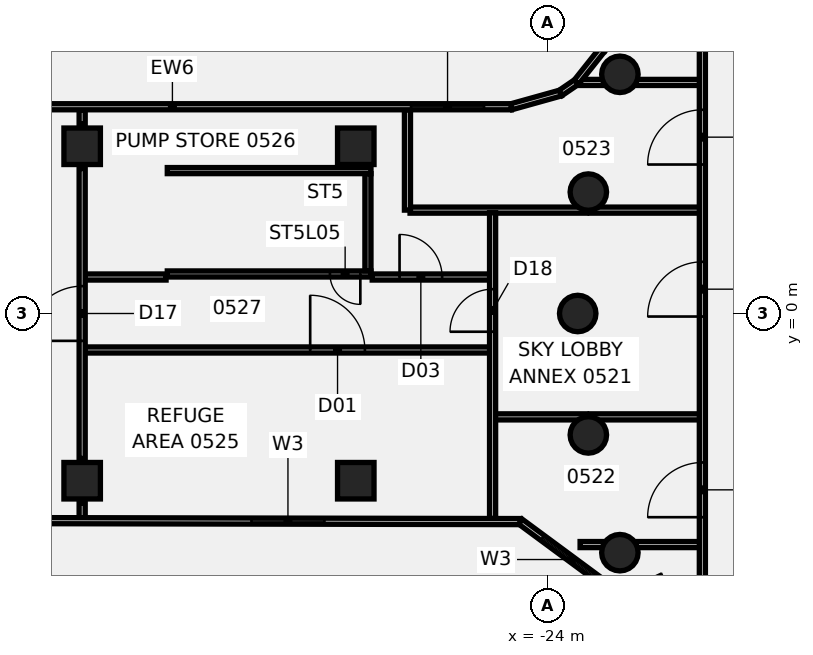
"""IFC4 building model, lengths in metres.
Left out: names, types, materials, properties, quantities, classifications, styles, units other than length and angle.
Written with IfcOpenShell. Run it as: python <this file> out.ifc"""

import sys

from ifc_helpers import new_model, si_unit, direction, frame, frame_2d, origin, origin_2d, place, context, subcontext, project, spatial, polyline, rectangle, circle, outline, extrude, element, fill, save


model = new_model("IFC4")
c1 = context("Model", 3, precision=1e-05, world=origin(), true_north=direction((0.0, 1.0)))
c2 = subcontext(c1, "Body", "Model", "MODEL_VIEW")
j1 = project(units=[si_unit("LENGTHUNIT", "METRE"), si_unit("PLANEANGLEUNIT", "RADIAN")], contexts=[c1])
p1 = place(None, origin())
s1 = spatial("IfcSite", under=j1, at=p1, CompositionType="ELEMENT")
p2 = place(p1, origin())
s2 = spatial("IfcBuilding", under=s1, at=p2, CompositionType="ELEMENT")
p3 = place(p2, frame((0.0, 0.0, 29.5)))
s3 = spatial("IfcBuildingStorey", under=s2, at=p3, CompositionType="ELEMENT", Elevation=29.5)
for number, where, z_axis, x_axis in (
    (1, (-21.613, 7.866, -0.6), (0.0, 0.0, 1.0), (1.0, 0.0, 0.0)),
    (2, (-22.651, 3.994, -0.6), (0.0, 0.0, 1.0), (1.0, 0.0, 0.0)),
    (3, (-23.0, 0.0, -0.6), (0.0, 0.0, 1.0), (1.0, 0.0, 0.0)),
    (4, (-22.651, -3.994, -0.6), (0.0, 0.0, 1.0), (1.0, 0.0, 0.0)),
    (5, (-21.613, -7.866, -0.6), (0.0, 0.0, 1.0), (1.0, 0.0, 0.0)),
):
    element("IfcColumn", number, at=place(p3, frame(where, z_axis=z_axis, x_axis=x_axis)), inside=s3, PredefinedType="COLUMN", context=c2, shape_type="SweptSolid", body=[
        extrude(circle(Radius=0.6, at=origin_2d()), origin(), (0.0, 0.0, 1.0), 4.96),
    ])
p4 = place(p3, frame((-39.3, -5.5, -0.6), z_axis=(0.0, 0.0, 1.0), x_axis=(1.0, 0.0, 0.0)))
e6 = element("IfcColumn", 6, at=p4, inside=s3, PredefinedType="COLUMN", context=c2, shape_type="SweptSolid", body=[
    extrude(rectangle(XDim=1.2, YDim=1.2, at=origin_2d()), origin(), (0.0, 0.0, 1.0), 4.926),
])
p5 = place(p3, frame((-39.3, 5.5, -0.6), z_axis=(0.0, 0.0, 1.0), x_axis=(1.0, 0.0, 0.0)))
e7 = element("IfcColumn", 7, at=p5, inside=s3, PredefinedType="COLUMN", context=c2, shape_type="SweptSolid", body=[
    extrude(rectangle(XDim=1.2, YDim=1.2, at=origin_2d()), origin(), (0.0, 0.0, 1.0), 4.926),
])
for number, where, z_axis, x_axis in (
    (8, (-30.3, -5.5, -0.6), (0.0, 0.0, 1.0), (1.0, 0.0, 0.0)),
    (9, (-30.3, 5.5, -0.6), (0.0, 0.0, 1.0), (1.0, 0.0, 0.0)),
):
    element("IfcColumn", number, at=place(p3, frame(where, z_axis=z_axis, x_axis=x_axis)), inside=s3, PredefinedType="COLUMN", context=c2, shape_type="SweptSolid", body=[
        extrude(rectangle(XDim=1.2, YDim=1.2, at=origin_2d()), origin(), (0.0, 0.0, 1.0), 4.939),
    ])
p6 = place(p3, frame((-39.22, -1.2, 0.0), z_axis=(0.0, 0.0, 1.0), x_axis=(1.0, 0.0, 0.0)))
e10 = element("IfcWall", 10, at=p6, inside=s3, PredefinedType="PARTITIONING", context=c2, shape_type="SweptSolid", body=[
    extrude(rectangle(XDim=13.335, YDim=0.2, at=frame_2d((6.667, 0.0))), origin(), (0.0, 0.0, 1.0), 3.76),
])
p7 = place(p6, frame((7.42, 0.0, 0.0)))
e11 = element("IfcOpeningElement", 11, at=p7, cuts=e10, PredefinedType="OPENING", context=c2, shape_type="SweptSolid", body=[
    extrude(rectangle(XDim=1.8, YDim=2.1, at=frame_2d((0.9, 1.05))), frame((0.0, 0.11, 0.0), z_axis=(0.0, -1.0, 0.0), x_axis=(1.0, 0.0, 0.0)), (0.0, 0.0, 1.0), 0.22),
])
p8 = place(p3, frame((-39.22, 1.2, 0.0), z_axis=(0.0, 0.0, 1.0), x_axis=(1.0, 0.0, 0.0)))
e12 = element("IfcWall", 12, at=p8, inside=s3, PredefinedType="PARTITIONING", context=c2, shape_type="SweptSolid", body=[
    extrude(rectangle(XDim=2.68, YDim=0.2, at=frame_2d((1.34, 0.0))), origin(), (0.0, 0.0, 1.0), 3.76),
])
p9 = place(p3, frame((-29.76, 1.2, 0.0), z_axis=(0.0, 0.0, 1.0), x_axis=(1.0, 0.0, 0.0)))
e13 = element("IfcWall", 13, at=p9, inside=s3, PredefinedType="PARTITIONING", context=c2, shape_type="SweptSolid", body=[
    extrude(rectangle(XDim=3.875, YDim=0.2, at=frame_2d((1.938, 0.0))), origin(), (0.0, 0.0, 1.0), 3.76),
])
p10 = place(p9, frame((0.9, 0.0, 0.0)))
e14 = element("IfcOpeningElement", 14, at=p10, cuts=e13, PredefinedType="OPENING", context=c2, shape_type="SweptSolid", body=[
    extrude(rectangle(XDim=1.4, YDim=2.1, at=frame_2d((0.7, 1.05))), frame((0.0, 0.11, 0.0), z_axis=(0.0, -1.0, 0.0), x_axis=(1.0, 0.0, 0.0)), (0.0, 0.0, 1.0), 0.22),
])
p11 = place(p3, frame((-28.515, 3.4, 0.0), z_axis=(0.0, 0.0, 1.0), x_axis=(1.0, 0.0, 0.0)))
e15 = element("IfcWall", 15, at=p11, inside=s3, PredefinedType="PARTITIONING", context=c2, shape_type="SweptSolid", body=[
    extrude(rectangle(XDim=5.804, YDim=0.2, at=frame_2d((2.902, 0.0))), origin(), (0.0, 0.0, 1.0), 3.76),
])
p12 = place(p3, frame((-22.591, 3.4, 0.0), z_axis=(0.0, 0.0, 1.0), x_axis=(1.0, 0.0, 0.0)))
e16 = element("IfcWall", 16, at=p12, inside=s3, PredefinedType="PARTITIONING", context=c2, shape_type="SweptSolid", body=[
    extrude(rectangle(XDim=3.605, YDim=0.2, at=frame_2d((1.803, 0.0))), origin(), (0.0, 0.0, 1.0), 3.76),
])
p13 = place(p3, frame((-25.715, -3.4, 0.0), z_axis=(0.0, 0.0, 1.0), x_axis=(1.0, 0.0, 0.0)))
e17 = element("IfcWall", 17, at=p13, inside=s3, PredefinedType="PARTITIONING", context=c2, shape_type="SweptSolid", body=[
    extrude(rectangle(XDim=3.004, YDim=0.2, at=frame_2d((1.502, 0.0))), origin(), (0.0, 0.0, 1.0), 3.76),
])
p14 = place(p3, frame((-22.591, -3.4, 0.0), z_axis=(0.0, 0.0, 1.0), x_axis=(1.0, 0.0, 0.0)))
e18 = element("IfcWall", 18, at=p14, inside=s3, PredefinedType="PARTITIONING", context=c2, shape_type="SweptSolid", body=[
    extrude(rectangle(XDim=3.605, YDim=0.2, at=frame_2d((1.803, 0.0))), origin(), (0.0, 0.0, 1.0), 3.76),
])
p15 = place(p3, frame((-22.922, -7.6, 0.0), z_axis=(0.0, 0.0, 1.0), x_axis=(1.0, 0.0, 0.0)))
e19 = element("IfcWall", 19, at=p15, inside=s3, PredefinedType="PARTITIONING", context=c2, shape_type="SweptSolid", body=[
    extrude(rectangle(XDim=0.77, YDim=0.2, at=frame_2d((0.385, 0.0))), origin(), (0.0, 0.0, 1.0), 3.76),
])
p16 = place(p3, frame((-21.074, -7.6, 0.0), z_axis=(0.0, 0.0, 1.0), x_axis=(1.0, 0.0, 0.0)))
e20 = element("IfcWall", 20, at=p16, inside=s3, PredefinedType="PARTITIONING", context=c2, shape_type="SweptSolid", body=[
    extrude(rectangle(XDim=2.089, YDim=0.2, at=frame_2d((1.044, 0.0))), origin(), (0.0, 0.0, 1.0), 3.76),
])
p17 = place(p3, frame((-22.921, 7.6, 0.0), z_axis=(0.0, 0.0, 1.0), x_axis=(1.0, 0.0, 0.0)))
e21 = element("IfcWall", 21, at=p17, inside=s3, PredefinedType="PARTITIONING", context=c2, shape_type="SweptSolid", body=[
    extrude(rectangle(XDim=0.769, YDim=0.2, at=frame_2d((0.385, 0.0))), origin(), (0.0, 0.0, 1.0), 3.76),
])
p18 = place(p3, frame((-21.074, 7.6, 0.0), z_axis=(0.0, 0.0, 1.0), x_axis=(1.0, 0.0, 0.0)))
e22 = element("IfcWall", 22, at=p18, inside=s3, PredefinedType="PARTITIONING", context=c2, shape_type="SweptSolid", body=[
    extrude(rectangle(XDim=2.089, YDim=0.2, at=frame_2d((1.044, 0.0))), origin(), (0.0, 0.0, 1.0), 3.76),
])
p19 = place(p3, frame((-39.3, -6.715, 0.0), z_axis=(0.0, 0.0, 1.0), x_axis=(0.0, 1.0, 0.0)))
e23 = element("IfcWall", 23, at=p19, inside=s3, PredefinedType="PARTITIONING", context=c2, shape_type="SweptSolid", body=[
    extrude(rectangle(XDim=0.485, YDim=0.2, at=frame_2d((0.243, 0.0))), origin(), (0.0, 0.0, 1.0), 3.76),
])
p20 = place(p3, frame((-39.3, -4.77, 0.0), z_axis=(0.0, 0.0, 1.0), x_axis=(0.0, 1.0, 0.0)))
e24 = element("IfcWall", 24, at=p20, inside=s3, PredefinedType="PARTITIONING", context=c2, shape_type="SweptSolid", body=[
    extrude(rectangle(XDim=9.54, YDim=0.2, at=frame_2d((4.77, 0.0))), origin(), (0.0, 0.0, 1.0), 3.76),
])
p21 = place(p20, frame((3.87, 0.0, 0.0)))
e25 = element("IfcOpeningElement", 25, at=p21, cuts=e24, PredefinedType="OPENING", context=c2, shape_type="SweptSolid", body=[
    extrude(rectangle(XDim=1.8, YDim=2.1, at=frame_2d((0.9, 1.05))), frame((0.0, 0.11, 0.0), z_axis=(0.0, -1.0, 0.0), x_axis=(1.0, 0.0, 0.0)), (0.0, 0.0, 1.0), 0.22),
])
p22 = place(p3, frame((-39.3, 6.23, 0.0), z_axis=(0.0, 0.0, 1.0), x_axis=(0.0, 1.0, 0.0)))
e26 = element("IfcWall", 26, at=p22, inside=s3, PredefinedType="PARTITIONING", context=c2, shape_type="SweptSolid", body=[
    extrude(rectangle(XDim=0.469, YDim=0.2, at=frame_2d((0.234, 0.0))), origin(), (0.0, 0.0, 1.0), 3.76),
])
p23 = place(p3, frame((-28.6, 3.4, 0.0), z_axis=(0.0, 0.0, 1.0), x_axis=(0.0, 1.0, 0.0)))
e27 = element("IfcWall", 27, at=p23, inside=s3, PredefinedType="PARTITIONING", context=c2, shape_type="SweptSolid", body=[
    extrude(rectangle(XDim=3.299, YDim=0.2, at=frame_2d((1.649, 0.0))), origin(), (0.0, 0.0, 1.0), 3.76),
])
p24 = place(p3, frame((-25.8, -6.742, 0.0), z_axis=(0.0, 0.0, 1.0), x_axis=(0.0, 1.0, 0.0)))
e28 = element("IfcWall", 28, at=p24, inside=s3, PredefinedType="PARTITIONING", context=c2, shape_type="SweptSolid", body=[
    extrude(rectangle(XDim=10.057, YDim=0.2, at=frame_2d((5.028, 0.0))), origin(), (0.0, 0.0, 1.0), 3.76),
])
p25 = place(p24, frame((6.142, 0.0, 0.0)))
e29 = element("IfcOpeningElement", 29, at=p25, cuts=e28, PredefinedType="OPENING", context=c2, shape_type="SweptSolid", body=[
    extrude(rectangle(XDim=1.4, YDim=2.1, at=frame_2d((0.7, 1.05))), frame((0.0, 0.11, 0.0), z_axis=(0.0, -1.0, 0.0), x_axis=(1.0, 0.0, 0.0)), (0.0, 0.0, 1.0), 0.22),
])
p26 = place(p3, frame((-18.9, -10.1, 0.0), z_axis=(0.0, 0.0, 1.0), x_axis=(0.0, 1.0, 0.0)))
e30 = element("IfcWall", 30, at=p26, inside=s3, PredefinedType="PARTITIONING", context=c2, shape_type="SweptSolid", body=[
    extrude(rectangle(XDim=20.2, YDim=0.2, at=frame_2d((10.1, 0.0))), origin(), (0.0, 0.0, 1.0), 3.76),
])
p27 = place(p26, frame((10.0, 0.0, 0.0)))
e31 = element("IfcOpeningElement", 31, at=p27, cuts=e30, PredefinedType="OPENING", context=c2, shape_type="SweptSolid", body=[
    extrude(rectangle(XDim=1.8, YDim=2.1, at=frame_2d((0.9, 1.05))), frame((0.0, 0.11, 0.0), z_axis=(0.0, -1.0, 0.0), x_axis=(1.0, 0.0, 0.0)), (0.0, 0.0, 1.0), 0.22),
])
p28 = place(p26, frame((3.4, 0.0, 0.0)))
e32 = element("IfcOpeningElement", 32, at=p28, cuts=e30, PredefinedType="OPENING", context=c2, shape_type="SweptSolid", body=[
    extrude(rectangle(XDim=1.8, YDim=2.1, at=frame_2d((0.9, 1.05))), frame((0.0, 0.11, 0.0), z_axis=(0.0, -1.0, 0.0), x_axis=(1.0, 0.0, 0.0)), (0.0, 0.0, 1.0), 0.22),
])
p29 = place(p26, frame((15.0, 0.0, 0.0)))
e33 = element("IfcOpeningElement", 33, at=p29, cuts=e30, PredefinedType="OPENING", context=c2, shape_type="SweptSolid", body=[
    extrude(rectangle(XDim=1.8, YDim=2.1, at=frame_2d((0.9, 1.05))), frame((0.0, 0.11, 0.0), z_axis=(0.0, -1.0, 0.0), x_axis=(1.0, 0.0, 0.0)), (0.0, 0.0, 1.0), 0.22),
])
p30 = place(p3, frame((-25.181, 6.8, 0.0), z_axis=(0.0, 0.0, 1.0), x_axis=(-1.0, 0.0, 0.0)))
e34 = element("IfcWall", 34, at=p30, inside=s3, PredefinedType="SOLIDWALL", context=c2, shape_type="SweptSolid", body=[
    extrude(rectangle(XDim=22.3, YDim=0.2, at=frame_2d((11.15, 0.0))), origin(), (0.0, 0.0, 1.0), 4.36),
])
p31 = place(p30, frame((0.9, 0.0, 1.4)))
e35 = element("IfcOpeningElement", 35, at=p31, cuts=e34, PredefinedType="OPENING", context=c2, shape_type="SweptSolid", body=[
    extrude(rectangle(XDim=2.4, YDim=2.1, at=frame_2d((1.2, 1.05))), frame((0.0, 0.11, 0.0), z_axis=(0.0, -1.0, 0.0), x_axis=(1.0, 0.0, 0.0)), (0.0, 0.0, 1.0), 0.22),
])
p32 = place(p3, frame((-47.481, -6.8, 0.0), z_axis=(0.0, 0.0, 1.0), x_axis=(0.999998066603, -0.001966415802, 0.0)))
e36 = element("IfcWall", 36, at=p32, inside=s3, PredefinedType="SOLIDWALL", context=c2, shape_type="SweptSolid", body=[
    extrude(rectangle(XDim=22.596, YDim=0.2, at=frame_2d((11.298, 0.0))), origin(), (0.0, 0.0, 1.0), 4.36),
])
p33 = place(p32, frame((3.3, 0.0, 1.4)))
e37 = element("IfcOpeningElement", 37, at=p33, cuts=e36, PredefinedType="OPENING", context=c2, shape_type="SweptSolid", body=[
    extrude(rectangle(XDim=2.4, YDim=2.1, at=frame_2d((1.2, 1.05))), frame((0.0, 0.11, 0.0), z_axis=(0.0, -1.0, 0.0), x_axis=(1.0, 0.0, 0.0)), (0.0, 0.0, 1.0), 0.22),
])
p34 = place(p32, frame((13.75, 0.0, 1.4)))
e38 = element("IfcOpeningElement", 38, at=p34, cuts=e36, PredefinedType="OPENING", context=c2, shape_type="SweptSolid", body=[
    extrude(rectangle(XDim=2.4, YDim=2.1, at=frame_2d((1.2, 1.05))), frame((0.0, 0.11, 0.0), z_axis=(0.0, -1.0, 0.0), x_axis=(1.0, 0.0, 0.0)), (0.0, 0.0, 1.0), 0.22),
])
p35 = place(p3, frame((-24.885, -6.844, 0.0), z_axis=(0.0, 0.0, 1.0), x_axis=(0.804392246617, -0.594098572278, 0.0)))
e39 = element("IfcWall", 39, at=p35, inside=s3, PredefinedType="SOLIDWALL", context=c2, shape_type="SweptSolid", body=[
    extrude(rectangle(XDim=3.544, YDim=0.2, at=frame_2d((1.772, 0.0))), origin(), (0.0, 0.0, 1.0), 4.36),
])
p36 = place(p35, frame((0.9, 0.0, 1.4)))
e40 = element("IfcOpeningElement", 40, at=p36, cuts=e39, PredefinedType="OPENING", context=c2, shape_type="SweptSolid", body=[
    extrude(rectangle(XDim=2.4, YDim=2.1, at=frame_2d((1.2, 1.05))), frame((0.0, 0.11, 0.0), z_axis=(0.0, -1.0, 0.0), x_axis=(1.0, 0.0, 0.0)), (0.0, 0.0, 1.0), 0.22),
])
p37 = place(p3, frame((-22.185, 8.687, 0.0), z_axis=(0.0, 0.0, 1.0), x_axis=(-0.62233065952, -0.782754463559, 0.0)))
e41 = element("IfcWall", 41, at=p37, inside=s3, PredefinedType="SOLIDWALL", context=c2, shape_type="SweptSolid", body=[
    extrude(rectangle(XDim=1.374, YDim=0.2, at=frame_2d((0.687, 0.0))), origin(), (0.0, 0.0, 1.0), 4.36),
])
p38 = place(p3, frame((-23.041, 7.611, 0.0), z_axis=(0.0, 0.0, 1.0), x_axis=(-0.825718659987, -0.564082170033, 0.0)))
e42 = element("IfcWall", 42, at=p38, inside=s3, PredefinedType="SOLIDWALL", context=c2, shape_type="SweptSolid", body=[
    extrude(rectangle(XDim=0.64, YDim=0.2, at=frame_2d((0.32, 0.0))), origin(), (0.0, 0.0, 1.0), 4.36),
])
p39 = place(p3, frame((-23.569, 7.25, 0.0), z_axis=(0.0, 0.0, 1.0), x_axis=(-0.963195423153, -0.268802114608, 0.0)))
e43 = element("IfcWall", 43, at=p39, inside=s3, PredefinedType="SOLIDWALL", context=c2, shape_type="SweptSolid", body=[
    extrude(rectangle(XDim=1.674, YDim=0.2, at=frame_2d((0.837, 0.0))), origin(), (0.0, 0.0, 1.0), 4.36),
])
p40 = place(p3, frame((-29.8, 1.3, 0.0), z_axis=(0.0, 0.0, 1.0), x_axis=(-1.0, 0.0, 0.0)))
e44 = element("IfcWall", 44, at=p40, inside=s3, PredefinedType="SHEAR", context=c2, shape_type="SweptSolid", body=[
    extrude(rectangle(XDim=6.7, YDim=0.2, at=frame_2d((3.35, 0.0))), origin(), (0.0, 0.0, 1.0), 3.76),
])
p41 = place(p40, frame((0.35, 0.0, 0.0)))
e45 = element("IfcOpeningElement", 45, at=p41, cuts=e44, PredefinedType="OPENING", context=c2, shape_type="SweptSolid", body=[
    extrude(rectangle(XDim=1.0, YDim=2.1, at=frame_2d((0.5, 1.05))), frame((0.0, 0.11, 0.0), z_axis=(0.0, -1.0, 0.0), x_axis=(1.0, 0.0, 0.0)), (0.0, 0.0, 1.0), 0.22),
])
p42 = place(p3, frame((-29.8, 4.7, 0.0), z_axis=(0.0, 0.0, 1.0), x_axis=(-1.0, 0.0, 0.0)))
e46 = element("IfcWall", 46, at=p42, inside=s3, PredefinedType="SHEAR", context=c2, shape_type="SweptSolid", body=[
    extrude(rectangle(XDim=6.7, YDim=0.2, at=frame_2d((3.35, 0.0))), origin(), (0.0, 0.0, 1.0), 3.76),
])
p43 = place(p3, frame((-29.9, 4.6, 0.0), z_axis=(0.0, 0.0, 1.0), x_axis=(0.0, -1.0, 0.0)))
e47 = element("IfcWall", 47, at=p43, inside=s3, PredefinedType="SHEAR", context=c2, shape_type="SweptSolid", body=[
    extrude(rectangle(XDim=3.2, YDim=0.2, at=frame_2d((1.6, 0.0))), origin(), (0.0, 0.0, 1.0), 3.76),
])
p44 = place(p3, origin())
e48 = element("IfcWall", 48, at=p44, inside=s3, PredefinedType="SHEAR", context=c2, shape_type="SweptSolid", body=[
    extrude(outline(polyline([(-36.3, 4.6), (-36.5, 4.6), (-36.5, 1.4), (-36.3, 1.4), (-36.3, 4.6)])), origin(), (0.0, 0.0, 1.0), 3.76),
])
p45 = place(p7, frame((1.8, 0.0, 0.0), z_axis=(0.0, 0.0, 1.0), x_axis=(-1.0, 0.0, 0.0)))
e49 = element("IfcDoor", 49, at=p45, inside=s3, OperationType="DOUBLE_DOOR_SINGLE_SWING", PredefinedType="DOOR", context=c2, shape_type="SweptSolid", body=[
    extrude(rectangle(XDim=1.8, YDim=2.1, at=frame_2d((0.9, 1.05))), frame((0.0, 0.025, 0.0), z_axis=(0.0, -1.0, 0.0), x_axis=(1.0, 0.0, 0.0)), (0.0, 0.0, 1.0), 0.05),
])
fill(e11, e49)
p46 = place(p10, origin())
e50 = element("IfcDoor", 50, at=p46, inside=s3, OperationType="DOUBLE_DOOR_SINGLE_SWING", PredefinedType="DOOR", context=c2, shape_type="SweptSolid", body=[
    extrude(rectangle(XDim=1.4, YDim=2.1, at=frame_2d((0.7, 1.05))), frame((0.0, 0.025, 0.0), z_axis=(0.0, -1.0, 0.0), x_axis=(1.0, 0.0, 0.0)), (0.0, 0.0, 1.0), 0.05),
])
fill(e14, e50)
p47 = place(p21, origin())
e51 = element("IfcDoor", 51, at=p47, inside=s3, OperationType="DOUBLE_DOOR_SINGLE_SWING", PredefinedType="DOOR", context=c2, shape_type="SweptSolid", body=[
    extrude(rectangle(XDim=1.8, YDim=2.1, at=frame_2d((0.9, 1.05))), frame((0.0, 0.025, 0.0), z_axis=(0.0, -1.0, 0.0), x_axis=(1.0, 0.0, 0.0)), (0.0, 0.0, 1.0), 0.05),
])
fill(e25, e51)
p48 = place(p25, frame((1.4, 0.0, 0.0), z_axis=(0.0, 0.0, 1.0), x_axis=(-1.0, 0.0, 0.0)))
e52 = element("IfcDoor", 52, at=p48, inside=s3, OperationType="DOUBLE_DOOR_SINGLE_SWING", PredefinedType="DOOR", context=c2, shape_type="SweptSolid", body=[
    extrude(rectangle(XDim=1.4, YDim=2.1, at=frame_2d((0.7, 1.05))), frame((0.0, 0.025, 0.0), z_axis=(0.0, -1.0, 0.0), x_axis=(1.0, 0.0, 0.0)), (0.0, 0.0, 1.0), 0.05),
])
fill(e29, e52)
p49 = place(p27, frame((1.8, 0.0, 0.0), z_axis=(0.0, 0.0, 1.0), x_axis=(-1.0, 0.0, 0.0)))
e53 = element("IfcDoor", 53, at=p49, inside=s3, OperationType="DOUBLE_DOOR_SINGLE_SWING", PredefinedType="DOOR", context=c2, shape_type="SweptSolid", body=[
    extrude(rectangle(XDim=1.8, YDim=2.1, at=frame_2d((0.9, 1.05))), frame((0.0, 0.025, 0.0), z_axis=(0.0, -1.0, 0.0), x_axis=(1.0, 0.0, 0.0)), (0.0, 0.0, 1.0), 0.05),
])
fill(e31, e53)
p50 = place(p28, origin())
e54 = element("IfcDoor", 54, at=p50, inside=s3, OperationType="DOUBLE_DOOR_SINGLE_SWING", PredefinedType="DOOR", context=c2, shape_type="SweptSolid", body=[
    extrude(rectangle(XDim=1.8, YDim=2.1, at=frame_2d((0.9, 1.05))), frame((0.0, 0.025, 0.0), z_axis=(0.0, -1.0, 0.0), x_axis=(1.0, 0.0, 0.0)), (0.0, 0.0, 1.0), 0.05),
])
fill(e32, e54)
p51 = place(p29, origin())
e55 = element("IfcDoor", 55, at=p51, inside=s3, OperationType="DOUBLE_DOOR_SINGLE_SWING", PredefinedType="DOOR", context=c2, shape_type="SweptSolid", body=[
    extrude(rectangle(XDim=1.8, YDim=2.1, at=frame_2d((0.9, 1.05))), frame((0.0, 0.025, 0.0), z_axis=(0.0, -1.0, 0.0), x_axis=(1.0, 0.0, 0.0)), (0.0, 0.0, 1.0), 0.05),
])
fill(e33, e55)
p52 = place(p36, origin())
e56 = element("IfcWindow", 56, at=p52, inside=s3, PartitioningType="SINGLE_PANEL", PredefinedType="WINDOW", context=c2, shape_type="SweptSolid", body=[
    extrude(rectangle(XDim=2.4, YDim=2.1, at=frame_2d((1.2, 1.05))), frame((0.0, 0.03, 0.0), z_axis=(0.0, -1.0, 0.0), x_axis=(1.0, 0.0, 0.0)), (0.0, 0.0, 1.0), 0.06),
])
fill(e40, e56)
p53 = place(p31, origin())
e57 = element("IfcWindow", 57, at=p53, inside=s3, PartitioningType="SINGLE_PANEL", PredefinedType="WINDOW", context=c2, shape_type="SweptSolid", body=[
    extrude(rectangle(XDim=2.4, YDim=2.1, at=frame_2d((1.2, 1.05))), frame((0.0, 0.03, 0.0), z_axis=(0.0, -1.0, 0.0), x_axis=(1.0, 0.0, 0.0)), (0.0, 0.0, 1.0), 0.06),
])
fill(e35, e57)
p54 = place(p34, origin())
e58 = element("IfcWindow", 58, at=p54, inside=s3, PartitioningType="SINGLE_PANEL", PredefinedType="WINDOW", context=c2, shape_type="SweptSolid", body=[
    extrude(rectangle(XDim=2.4, YDim=2.1, at=frame_2d((1.2, 1.05))), frame((0.0, 0.03, 0.0), z_axis=(0.0, -1.0, 0.0), x_axis=(1.0, 0.0, 0.0)), (0.0, 0.0, 1.0), 0.06),
])
fill(e38, e58)
p55 = place(p41, origin())
e59 = element("IfcDoor", 59, at=p55, inside=s3, OperationType="SINGLE_SWING_LEFT", PredefinedType="DOOR", context=c2, shape_type="SweptSolid", body=[
    extrude(rectangle(XDim=1.0, YDim=2.1, at=frame_2d((0.5, 1.05))), frame((0.0, 0.025, 0.0), z_axis=(0.0, -1.0, 0.0), x_axis=(1.0, 0.0, 0.0)), (0.0, 0.0, 1.0), 0.05),
])
fill(e45, e59)
save(model, sys.argv[1])
